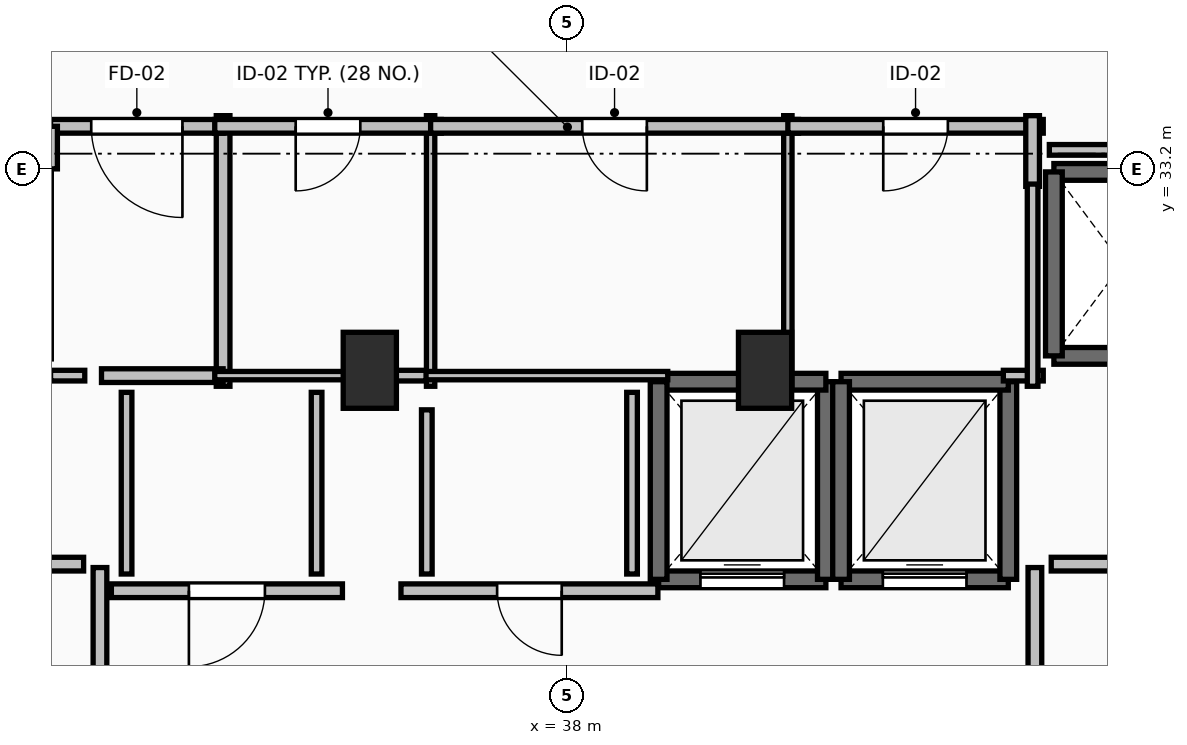
"""IFC4 building model, lengths in metres.
Left out: names, types, materials, properties, quantities, classifications, styles, units other than length and angle.
Written with IfcOpenShell. Run it as: python <this file> out.ifc"""

import sys

from ifc_helpers import new_model, si_unit, direction, frame, frame_2d, origin, origin_2d, place, context, subcontext, project, spatial, rectangle, extrude, element, fill, save


model = new_model("IFC4")
c1 = context("Model", 3, precision=1e-05, world=origin(), true_north=direction((0.0, 1.0)))
c2 = subcontext(c1, "Body", "Model", "MODEL_VIEW")
j1 = project(units=[si_unit("LENGTHUNIT", "METRE"), si_unit("PLANEANGLEUNIT", "RADIAN")], contexts=[c1])
p1 = place(None, origin())
s1 = spatial("IfcSite", under=j1, at=p1, CompositionType="ELEMENT")
p2 = place(p1, origin())
s2 = spatial("IfcBuilding", under=s1, at=p2, CompositionType="ELEMENT")
p3 = place(p2, frame((0.0, 0.0, 262.65)))
s3 = spatial("IfcBuildingStorey", under=s2, at=p3, CompositionType="ELEMENT", Elevation=262.65)
for number, where, z_axis, x_axis in (
    (1, (35.4, 30.55, 0.0), (0.0, 0.0, 1.0), (1.0, 0.0, 0.0)),
    (2, (40.6, 30.55, 0.0), (0.0, 0.0, 1.0), (1.0, 0.0, 0.0)),
):
    element("IfcColumn", number, at=place(p3, frame(where, z_axis=z_axis, x_axis=x_axis)), inside=s3, PredefinedType="PILASTER", context=c2, shape_type="SweptSolid", body=[
        extrude(rectangle(XDim=0.7, YDim=1.0, at=origin_2d()), origin(), (0.0, 0.0, 1.0), 3.55),
    ])
p4 = place(p3, frame((39.2, 27.8, 0.0), z_axis=(0.0, 0.0, 1.0), x_axis=(1.0, 0.0, 0.0)))
e3 = element("IfcWall", 3, at=p4, inside=s3, PredefinedType="SOLIDWALL", context=c2, shape_type="SweptSolid", body=[
    extrude(rectangle(XDim=2.2, YDim=0.22, at=frame_2d((1.1, 0.0))), origin(), (0.0, 0.0, 1.0), 3.29),
])
p5 = place(p4, frame((0.55, 0.0, 0.0)))
e4 = element("IfcOpeningElement", 4, at=p5, cuts=e3, PredefinedType="OPENING", context=c2, shape_type="SweptSolid", body=[
    extrude(rectangle(XDim=1.1, YDim=2.2, at=frame_2d((0.55, 1.1))), frame((0.0, 0.125, 0.0), z_axis=(0.0, -1.0, 0.0), x_axis=(1.0, 0.0, 0.0)), (0.0, 0.0, 1.0), 0.25),
])
p6 = place(p3, frame((41.4, 27.8, 0.0), z_axis=(0.0, 0.0, 1.0), x_axis=(0.0, 1.0, 0.0)))
e5 = element("IfcWall", 5, at=p6, inside=s3, PredefinedType="SOLIDWALL", context=c2, shape_type="SweptSolid", body=[
    extrude(rectangle(XDim=2.6, YDim=0.22, at=frame_2d((1.3, 0.0))), origin(), (0.0, 0.0, 1.0), 3.29),
])
p7 = place(p3, frame((41.4, 30.4, 0.0), z_axis=(0.0, 0.0, 1.0), x_axis=(-1.0, 0.0, 0.0)))
e6 = element("IfcWall", 6, at=p7, inside=s3, PredefinedType="SOLIDWALL", context=c2, shape_type="SweptSolid", body=[
    extrude(rectangle(XDim=2.2, YDim=0.22, at=frame_2d((1.1, 0.0))), origin(), (0.0, 0.0, 1.0), 3.29),
])
p8 = place(p3, frame((39.2, 30.4, 0.0), z_axis=(0.0, 0.0, 1.0), x_axis=(0.0, -1.0, 0.0)))
e7 = element("IfcWall", 7, at=p8, inside=s3, PredefinedType="SOLIDWALL", context=c2, shape_type="SweptSolid", body=[
    extrude(rectangle(XDim=2.6, YDim=0.22, at=frame_2d((1.3, 0.0))), origin(), (0.0, 0.0, 1.0), 3.29),
])
p9 = place(p3, frame((41.6, 27.8, 0.0), z_axis=(0.0, 0.0, 1.0), x_axis=(1.0, 0.0, 0.0)))
e8 = element("IfcWall", 8, at=p9, inside=s3, PredefinedType="SOLIDWALL", context=c2, shape_type="SweptSolid", body=[
    extrude(rectangle(XDim=2.2, YDim=0.22, at=frame_2d((1.1, 0.0))), origin(), (0.0, 0.0, 1.0), 3.29),
])
p10 = place(p9, frame((0.55, 0.0, 0.0)))
e9 = element("IfcOpeningElement", 9, at=p10, cuts=e8, PredefinedType="OPENING", context=c2, shape_type="SweptSolid", body=[
    extrude(rectangle(XDim=1.1, YDim=2.2, at=frame_2d((0.55, 1.1))), frame((0.0, 0.125, 0.0), z_axis=(0.0, -1.0, 0.0), x_axis=(1.0, 0.0, 0.0)), (0.0, 0.0, 1.0), 0.25),
])
p11 = place(p3, frame((43.8, 27.8, 0.0), z_axis=(0.0, 0.0, 1.0), x_axis=(0.0, 1.0, 0.0)))
e10 = element("IfcWall", 10, at=p11, inside=s3, PredefinedType="SOLIDWALL", context=c2, shape_type="SweptSolid", body=[
    extrude(rectangle(XDim=2.6, YDim=0.22, at=frame_2d((1.3, 0.0))), origin(), (0.0, 0.0, 1.0), 3.29),
])
p12 = place(p3, frame((43.8, 30.4, 0.0), z_axis=(0.0, 0.0, 1.0), x_axis=(-1.0, 0.0, 0.0)))
e11 = element("IfcWall", 11, at=p12, inside=s3, PredefinedType="SOLIDWALL", context=c2, shape_type="SweptSolid", body=[
    extrude(rectangle(XDim=2.2, YDim=0.22, at=frame_2d((1.1, 0.0))), origin(), (0.0, 0.0, 1.0), 3.29),
])
p13 = place(p3, frame((41.6, 30.4, 0.0), z_axis=(0.0, 0.0, 1.0), x_axis=(0.0, -1.0, 0.0)))
e12 = element("IfcWall", 12, at=p13, inside=s3, PredefinedType="SOLIDWALL", context=c2, shape_type="SweptSolid", body=[
    extrude(rectangle(XDim=2.6, YDim=0.22, at=frame_2d((1.3, 0.0))), origin(), (0.0, 0.0, 1.0), 3.29),
])
for number, where, z_axis, x_axis in (
    (13, (44.4, 30.74, 0.0), (0.0, 0.0, 1.0), (1.0, 0.0, 0.0)),
    (14, (46.2, 33.16, 0.0), (0.0, 0.0, 1.0), (-1.0, 0.0, 0.0)),
):
    element("IfcWall", number, at=place(p3, frame(where, z_axis=z_axis, x_axis=x_axis)), inside=s3, PredefinedType="SOLIDWALL", context=c2, shape_type="SweptSolid", body=[
        extrude(rectangle(XDim=1.8, YDim=0.22, at=frame_2d((0.9, 0.0))), origin(), (0.0, 0.0, 1.0), 3.29),
    ])
p14 = place(p3, frame((44.4, 33.16, 0.0), z_axis=(0.0, 0.0, 1.0), x_axis=(0.0, -1.0, 0.0)))
e15 = element("IfcWall", 15, at=p14, inside=s3, PredefinedType="SOLIDWALL", context=c2, shape_type="SweptSolid", body=[
    extrude(rectangle(XDim=2.42, YDim=0.22, at=frame_2d((1.21, 0.0))), origin(), (0.0, 0.0, 1.0), 3.29),
])
p15 = place(p3, frame((31.85, 24.045, 0.0), z_axis=(0.0, 0.0, 1.0), x_axis=(0.0, 1.0, 0.0)))
e16 = element("IfcWall", 16, at=p15, inside=s3, PredefinedType="PARTITIONING", context=c2, shape_type="SweptSolid", body=[
    extrude(rectangle(XDim=3.91, YDim=0.18, at=frame_2d((1.955, 0.0))), origin(), (0.0, 0.0, 1.0), 3.29),
])
p16 = place(p15, frame((1.355, 0.0, 0.0)))
e17 = element("IfcOpeningElement", 17, at=p16, cuts=e16, PredefinedType="OPENING", context=c2, shape_type="SweptSolid", body=[
    extrude(rectangle(XDim=1.2, YDim=2.15, at=frame_2d((0.6, 1.075))), frame((0.0, 0.105, 0.0), z_axis=(0.0, -1.0, 0.0), x_axis=(1.0, 0.0, 0.0)), (0.0, 0.0, 1.0), 0.21),
])
p17 = place(p3, frame((44.15, 27.955, 0.0), z_axis=(0.0, 0.0, 1.0), x_axis=(0.0, -1.0, 0.0)))
e18 = element("IfcWall", 18, at=p17, inside=s3, PredefinedType="PARTITIONING", context=c2, shape_type="SweptSolid", body=[
    extrude(rectangle(XDim=3.91, YDim=0.18, at=frame_2d((1.955, 0.0))), origin(), (0.0, 0.0, 1.0), 3.29),
])
p18 = place(p17, frame((1.355, 0.0, 0.0)))
e19 = element("IfcOpeningElement", 19, at=p18, cuts=e18, PredefinedType="OPENING", context=c2, shape_type="SweptSolid", body=[
    extrude(rectangle(XDim=1.2, YDim=2.15, at=frame_2d((0.6, 1.075))), frame((0.0, 0.105, 0.0), z_axis=(0.0, -1.0, 0.0), x_axis=(1.0, 0.0, 0.0)), (0.0, 0.0, 1.0), 0.21),
])
p19 = place(p3, frame((33.47, 30.34, 0.0), z_axis=(0.0, 0.0, 1.0), x_axis=(0.0, 1.0, 0.0)))
e20 = element("IfcWall", 20, at=p19, inside=s3, PredefinedType="PARTITIONING", context=c2, shape_type="SweptSolid", body=[
    extrude(rectangle(XDim=3.56, YDim=0.18, at=frame_2d((1.78, 0.0))), origin(), (0.0, 0.0, 1.0), 3.29),
])
p20 = place(p3, frame((31.87, 30.48, 0.0), z_axis=(0.0, 0.0, 1.0), x_axis=(1.0, 0.0, 0.0)))
e21 = element("IfcWall", 21, at=p20, inside=s3, PredefinedType="PARTITIONING", context=c2, shape_type="SweptSolid", body=[
    extrude(rectangle(XDim=1.6, YDim=0.18, at=frame_2d((0.8, 0.0))), origin(), (0.0, 0.0, 1.0), 3.29),
])
p21 = place(p3, frame((33.47, 33.76, 0.0), z_axis=(0.0, 0.0, 1.0), x_axis=(-1.0, 0.0, 0.0)))
e22 = element("IfcWall", 22, at=p21, inside=s3, PredefinedType="PARTITIONING", context=c2, shape_type="SweptSolid", body=[
    extrude(rectangle(XDim=2.27, YDim=0.18, at=frame_2d((1.135, 0.0))), origin(), (0.0, 0.0, 1.0), 3.29),
])
p22 = place(p21, frame((0.535, 0.0, 0.0)))
e23 = element("IfcOpeningElement", 23, at=p22, cuts=e22, PredefinedType="OPENING", context=c2, shape_type="SweptSolid", body=[
    extrude(rectangle(XDim=1.2, YDim=2.15, at=frame_2d((0.6, 1.075))), frame((0.0, 0.105, 0.0), z_axis=(0.0, -1.0, 0.0), x_axis=(1.0, 0.0, 0.0)), (0.0, 0.0, 1.0), 0.21),
])
p23 = place(p3, frame((31.2, 33.76, 0.0), z_axis=(0.0, 0.0, 1.0), x_axis=(0.0, -1.0, 0.0)))
e24 = element("IfcWall", 24, at=p23, inside=s3, PredefinedType="PARTITIONING", context=c2, shape_type="SweptSolid", body=[
    extrude(rectangle(XDim=0.56, YDim=0.18, at=frame_2d((0.28, 0.0))), origin(), (0.0, 0.0, 1.0), 3.29),
])
p24 = place(p3, frame((35.04, 27.65, 0.0), z_axis=(0.0, 0.0, 1.0), x_axis=(-1.0, 0.0, 0.0)))
e25 = element("IfcWall", 25, at=p24, inside=s3, PredefinedType="PARTITIONING", context=c2, shape_type="SweptSolid", body=[
    extrude(rectangle(XDim=3.04, YDim=0.18, at=frame_2d((1.52, 0.0))), origin(), (0.0, 0.0, 1.0), 3.29),
])
p25 = place(p24, frame((1.02, 0.0, 0.0)))
e26 = element("IfcOpeningElement", 26, at=p25, cuts=e25, PredefinedType="OPENING", context=c2, shape_type="SweptSolid", body=[
    extrude(rectangle(XDim=1.0, YDim=2.15, at=frame_2d((0.5, 1.075))), frame((0.0, 0.105, 0.0), z_axis=(0.0, -1.0, 0.0), x_axis=(1.0, 0.0, 0.0)), (0.0, 0.0, 1.0), 0.21),
])
p26 = place(p3, frame((39.19, 27.65, 0.0), z_axis=(0.0, 0.0, 1.0), x_axis=(-1.0, 0.0, 0.0)))
e27 = element("IfcWall", 27, at=p26, inside=s3, PredefinedType="PARTITIONING", context=c2, shape_type="SweptSolid", body=[
    extrude(rectangle(XDim=3.38, YDim=0.18, at=frame_2d((1.69, 0.0))), origin(), (0.0, 0.0, 1.0), 3.29),
])
p27 = place(p26, frame((1.265, 0.0, 0.0)))
e28 = element("IfcOpeningElement", 28, at=p27, cuts=e27, PredefinedType="OPENING", context=c2, shape_type="SweptSolid", body=[
    extrude(rectangle(XDim=0.85, YDim=2.1, at=frame_2d((0.425, 1.05))), frame((0.0, 0.105, 0.0), z_axis=(0.0, -1.0, 0.0), x_axis=(1.0, 0.0, 0.0)), (0.0, 0.0, 1.0), 0.21),
])
p28 = place(p3, frame((36.2, 30.34, 0.0), z_axis=(0.0, 0.0, 1.0), x_axis=(0.0, 1.0, 0.0)))
e29 = element("IfcWall", 29, at=p28, inside=s3, PredefinedType="PARTITIONING", context=c2, shape_type="SweptSolid", body=[
    extrude(rectangle(XDim=3.56, YDim=0.11, at=frame_2d((1.78, 0.0))), origin(), (0.0, 0.0, 1.0), 2.482),
])
p29 = place(p3, frame((33.36, 30.48, 0.0), z_axis=(0.0, 0.0, 1.0), x_axis=(1.0, 0.0, 0.0)))
e30 = element("IfcWall", 30, at=p29, inside=s3, PredefinedType="PARTITIONING", context=c2, shape_type="SweptSolid", body=[
    extrude(rectangle(XDim=1.81, YDim=0.11, at=frame_2d((0.905, 0.0))), origin(), (0.0, 0.0, 1.0), 3.29),
])
p30 = place(p3, frame((36.34, 33.76, 0.0), z_axis=(0.0, 0.0, 1.0), x_axis=(-1.0, 0.0, 0.0)))
e31 = element("IfcWall", 31, at=p30, inside=s3, PredefinedType="PARTITIONING", context=c2, shape_type="SweptSolid", body=[
    extrude(rectangle(XDim=2.98, YDim=0.18, at=frame_2d((1.49, 0.0))), origin(), (0.0, 0.0, 1.0), 3.29),
])
p31 = place(p30, frame((1.065, 0.0, 0.0)))
e32 = element("IfcOpeningElement", 32, at=p31, cuts=e31, PredefinedType="OPENING", context=c2, shape_type="SweptSolid", body=[
    extrude(rectangle(XDim=0.85, YDim=2.1, at=frame_2d((0.425, 1.05))), frame((0.0, 0.105, 0.0), z_axis=(0.0, -1.0, 0.0), x_axis=(1.0, 0.0, 0.0)), (0.0, 0.0, 1.0), 0.21),
])
p32 = place(p3, frame((40.9, 30.34, 0.0), z_axis=(0.0, 0.0, 1.0), x_axis=(0.0, 1.0, 0.0)))
e33 = element("IfcWall", 33, at=p32, inside=s3, PredefinedType="PARTITIONING", context=c2, shape_type="SweptSolid", body=[
    extrude(rectangle(XDim=3.56, YDim=0.11, at=frame_2d((1.78, 0.0))), origin(), (0.0, 0.0, 1.0), 3.29),
])
p33 = place(p3, frame((36.11, 30.48, 0.0), z_axis=(0.0, 0.0, 1.0), x_axis=(1.0, 0.0, 0.0)))
e34 = element("IfcWall", 34, at=p33, inside=s3, PredefinedType="PARTITIONING", context=c2, shape_type="SweptSolid", body=[
    extrude(rectangle(XDim=3.21, YDim=0.11, at=frame_2d((1.605, 0.0))), origin(), (0.0, 0.0, 1.0), 2.482),
])
p34 = place(p3, frame((41.04, 33.76, 0.0), z_axis=(0.0, 0.0, 1.0), x_axis=(-1.0, 0.0, 0.0)))
e35 = element("IfcWall", 35, at=p34, inside=s3, PredefinedType="PARTITIONING", context=c2, shape_type="SweptSolid", body=[
    extrude(rectangle(XDim=4.84, YDim=0.18, at=frame_2d((2.42, 0.0))), origin(), (0.0, 0.0, 1.0), 3.29),
])
p35 = place(p34, frame((1.995, 0.0, 0.0)))
e36 = element("IfcOpeningElement", 36, at=p35, cuts=e35, PredefinedType="OPENING", context=c2, shape_type="SweptSolid", body=[
    extrude(rectangle(XDim=0.85, YDim=2.1, at=frame_2d((0.425, 1.05))), frame((0.0, 0.105, 0.0), z_axis=(0.0, -1.0, 0.0), x_axis=(1.0, 0.0, 0.0)), (0.0, 0.0, 1.0), 0.21),
])
p36 = place(p3, frame((44.26, 33.76, 0.0), z_axis=(0.0, 0.0, 1.0), x_axis=(-1.0, 0.0, 0.0)))
e37 = element("IfcWall", 37, at=p36, inside=s3, PredefinedType="PARTITIONING", context=c2, shape_type="SweptSolid", body=[
    extrude(rectangle(XDim=3.36, YDim=0.18, at=frame_2d((1.68, 0.0))), origin(), (0.0, 0.0, 1.0), 3.29),
])
p37 = place(p36, frame((1.255, 0.0, 0.0)))
e38 = element("IfcOpeningElement", 38, at=p37, cuts=e37, PredefinedType="OPENING", context=c2, shape_type="SweptSolid", body=[
    extrude(rectangle(XDim=0.85, YDim=2.1, at=frame_2d((0.425, 1.05))), frame((0.0, 0.105, 0.0), z_axis=(0.0, -1.0, 0.0), x_axis=(1.0, 0.0, 0.0)), (0.0, 0.0, 1.0), 0.21),
])
p38 = place(p3, frame((44.12, 32.97, 0.0), z_axis=(0.0, 0.0, 1.0), x_axis=(0.0, 1.0, 0.0)))
e39 = element("IfcWall", 39, at=p38, inside=s3, PredefinedType="PARTITIONING", context=c2, shape_type="SweptSolid", body=[
    extrude(rectangle(XDim=0.93, YDim=0.18, at=frame_2d((0.465, 0.0))), origin(), (0.0, 0.0, 1.0), 3.29),
])
for number, where, z_axis, x_axis in (
    (40, (31.635, 28.0, 0.0), (0.0, 0.0, 1.0), (-1.0, 0.0, 0.0)),
    (41, (45.28, 28.0, 0.0), (0.0, 0.0, 1.0), (-1.0, 0.0, 0.0)),
):
    element("IfcWall", number, at=place(p3, frame(where, z_axis=z_axis, x_axis=x_axis)), inside=s3, PredefinedType="PARTITIONING", context=c2, shape_type="SweptSolid", body=[
        extrude(rectangle(XDim=0.915, YDim=0.18, at=frame_2d((0.458, 0.0))), origin(), (0.0, 0.0, 1.0), 3.29),
    ])
p39 = place(p3, frame((31.2, 30.48, 0.0), z_axis=(0.0, 0.0, 1.0), x_axis=(1.0, 0.0, 0.0)))
e42 = element("IfcWall", 42, at=p39, inside=s3, PredefinedType="PARTITIONING", context=c2, shape_type="SweptSolid", body=[
    extrude(rectangle(XDim=0.45, YDim=0.14, at=frame_2d((0.225, 0.0))), origin(), (0.0, 0.0, 1.0), 3.29),
])
p40 = place(p3, frame((35.14, 30.48, 0.0), z_axis=(0.0, 0.0, 1.0), x_axis=(1.0, 0.0, 0.0)))
e43 = element("IfcWall", 43, at=p40, inside=s3, PredefinedType="PARTITIONING", context=c2, shape_type="SweptSolid", body=[
    extrude(rectangle(XDim=1.0, YDim=0.14, at=frame_2d((0.5, 0.0))), origin(), (0.0, 0.0, 1.0), 2.482),
])
p41 = place(p3, frame((43.735, 30.48, 0.0), z_axis=(0.0, 0.0, 1.0), x_axis=(1.0, 0.0, 0.0)))
e44 = element("IfcWall", 44, at=p41, inside=s3, PredefinedType="PARTITIONING", context=c2, shape_type="SweptSolid", body=[
    extrude(rectangle(XDim=0.525, YDim=0.14, at=frame_2d((0.262, 0.0))), origin(), (0.0, 0.0, 1.0), 3.29),
])
p42 = place(p3, frame((44.12, 30.34, 0.0), z_axis=(0.0, 0.0, 1.0), x_axis=(0.0, 1.0, 0.0)))
e45 = element("IfcWall", 45, at=p42, inside=s3, PredefinedType="PARTITIONING", context=c2, shape_type="SweptSolid", body=[
    extrude(rectangle(XDim=2.66, YDim=0.14, at=frame_2d((1.33, 0.0))), origin(), (0.0, 0.0, 1.0), 3.29),
])
for number, where, z_axis, x_axis in (
    (46, (32.2, 30.26, 0.0), (0.0, 0.0, 1.0), (0.0, -1.0, 0.0)),
    (47, (34.7, 27.87, 0.0), (0.0, 0.0, 1.0), (0.0, 1.0, 0.0)),
):
    element("IfcWall", number, at=place(p3, frame(where, z_axis=z_axis, x_axis=x_axis)), inside=s3, PredefinedType="PARTITIONING", context=c2, shape_type="SweptSolid", body=[
        extrude(rectangle(XDim=2.39, YDim=0.14, at=frame_2d((1.195, 0.0))), origin(), (0.0, 0.0, 1.0), 3.29),
    ])
p43 = place(p3, frame((36.15, 30.03, 0.0), z_axis=(0.0, 0.0, 1.0), x_axis=(0.0, -1.0, 0.0)))
e48 = element("IfcWall", 48, at=p43, inside=s3, PredefinedType="PARTITIONING", context=c2, shape_type="SweptSolid", body=[
    extrude(rectangle(XDim=2.16, YDim=0.14, at=frame_2d((1.08, 0.0))), origin(), (0.0, 0.0, 1.0), 3.29),
])
p44 = place(p3, frame((38.85, 27.87, 0.0), z_axis=(0.0, 0.0, 1.0), x_axis=(0.0, 1.0, 0.0)))
e49 = element("IfcWall", 49, at=p44, inside=s3, PredefinedType="PARTITIONING", context=c2, shape_type="SweptSolid", body=[
    extrude(rectangle(XDim=2.39, YDim=0.14, at=frame_2d((1.195, 0.0))), origin(), (0.0, 0.0, 1.0), 3.29),
])
p45 = place(p3, frame((48.55, 33.45, 0.0), z_axis=(0.0, 0.0, 1.0), x_axis=(-1.0, 0.0, 0.0)))
e50 = element("IfcWall", 50, at=p45, inside=s3, PredefinedType="PARTITIONING", context=c2, shape_type="SweptSolid", body=[
    extrude(rectangle(XDim=4.21, YDim=0.14, at=frame_2d((2.105, 0.0))), origin(), (0.0, 0.0, 1.0), 2.482),
])
p46 = place(p5, origin())
e51 = element("IfcDoor", 51, at=p46, inside=s3, OperationType="SLIDING_TO_LEFT", PredefinedType="DOOR", context=c2, shape_type="SweptSolid", body=[
    extrude(rectangle(XDim=1.1, YDim=2.2, at=frame_2d((0.55, 1.1))), frame((0.0, 0.025, 0.0), z_axis=(0.0, -1.0, 0.0), x_axis=(1.0, 0.0, 0.0)), (0.0, 0.0, 1.0), 0.05),
])
fill(e4, e51)
p47 = place(p10, origin())
e52 = element("IfcDoor", 52, at=p47, inside=s3, OperationType="SLIDING_TO_LEFT", PredefinedType="DOOR", context=c2, shape_type="SweptSolid", body=[
    extrude(rectangle(XDim=1.1, YDim=2.2, at=frame_2d((0.55, 1.1))), frame((0.0, 0.025, 0.0), z_axis=(0.0, -1.0, 0.0), x_axis=(1.0, 0.0, 0.0)), (0.0, 0.0, 1.0), 0.05),
])
fill(e9, e52)
p48 = place(p22, origin())
e53 = element("IfcDoor", 53, at=p48, inside=s3, OperationType="SINGLE_SWING_LEFT", PredefinedType="DOOR", context=c2, shape_type="SweptSolid", body=[
    extrude(rectangle(XDim=1.2, YDim=2.15, at=frame_2d((0.6, 1.075))), frame((0.0, 0.025, 0.0), z_axis=(0.0, -1.0, 0.0), x_axis=(1.0, 0.0, 0.0)), (0.0, 0.0, 1.0), 0.05),
])
fill(e23, e53)
p49 = place(p25, origin())
e54 = element("IfcDoor", 54, at=p49, inside=s3, OperationType="SINGLE_SWING_RIGHT", PredefinedType="DOOR", context=c2, shape_type="SweptSolid", body=[
    extrude(rectangle(XDim=1.0, YDim=2.15, at=frame_2d((0.5, 1.075))), frame((0.0, 0.025, 0.0), z_axis=(0.0, -1.0, 0.0), x_axis=(1.0, 0.0, 0.0)), (0.0, 0.0, 1.0), 0.05),
])
fill(e26, e54)
p50 = place(p27, origin())
e55 = element("IfcDoor", 55, at=p50, inside=s3, OperationType="SINGLE_SWING_LEFT", PredefinedType="DOOR", context=c2, shape_type="SweptSolid", body=[
    extrude(rectangle(XDim=0.85, YDim=2.1, at=frame_2d((0.425, 1.05))), frame((0.0, 0.025, 0.0), z_axis=(0.0, -1.0, 0.0), x_axis=(1.0, 0.0, 0.0)), (0.0, 0.0, 1.0), 0.05),
])
fill(e28, e55)
p51 = place(p31, origin())
e56 = element("IfcDoor", 56, at=p51, inside=s3, OperationType="SINGLE_SWING_RIGHT", PredefinedType="DOOR", context=c2, shape_type="SweptSolid", body=[
    extrude(rectangle(XDim=0.85, YDim=2.1, at=frame_2d((0.425, 1.05))), frame((0.0, 0.025, 0.0), z_axis=(0.0, -1.0, 0.0), x_axis=(1.0, 0.0, 0.0)), (0.0, 0.0, 1.0), 0.05),
])
fill(e32, e56)
p52 = place(p35, origin())
e57 = element("IfcDoor", 57, at=p52, inside=s3, OperationType="SINGLE_SWING_LEFT", PredefinedType="DOOR", context=c2, shape_type="SweptSolid", body=[
    extrude(rectangle(XDim=0.85, YDim=2.1, at=frame_2d((0.425, 1.05))), frame((0.0, 0.025, 0.0), z_axis=(0.0, -1.0, 0.0), x_axis=(1.0, 0.0, 0.0)), (0.0, 0.0, 1.0), 0.05),
])
fill(e36, e57)
p53 = place(p37, origin())
e58 = element("IfcDoor", 58, at=p53, inside=s3, OperationType="SINGLE_SWING_RIGHT", PredefinedType="DOOR", context=c2, shape_type="SweptSolid", body=[
    extrude(rectangle(XDim=0.85, YDim=2.1, at=frame_2d((0.425, 1.05))), frame((0.0, 0.025, 0.0), z_axis=(0.0, -1.0, 0.0), x_axis=(1.0, 0.0, 0.0)), (0.0, 0.0, 1.0), 0.05),
])
fill(e38, e58)
save(model, sys.argv[1])
